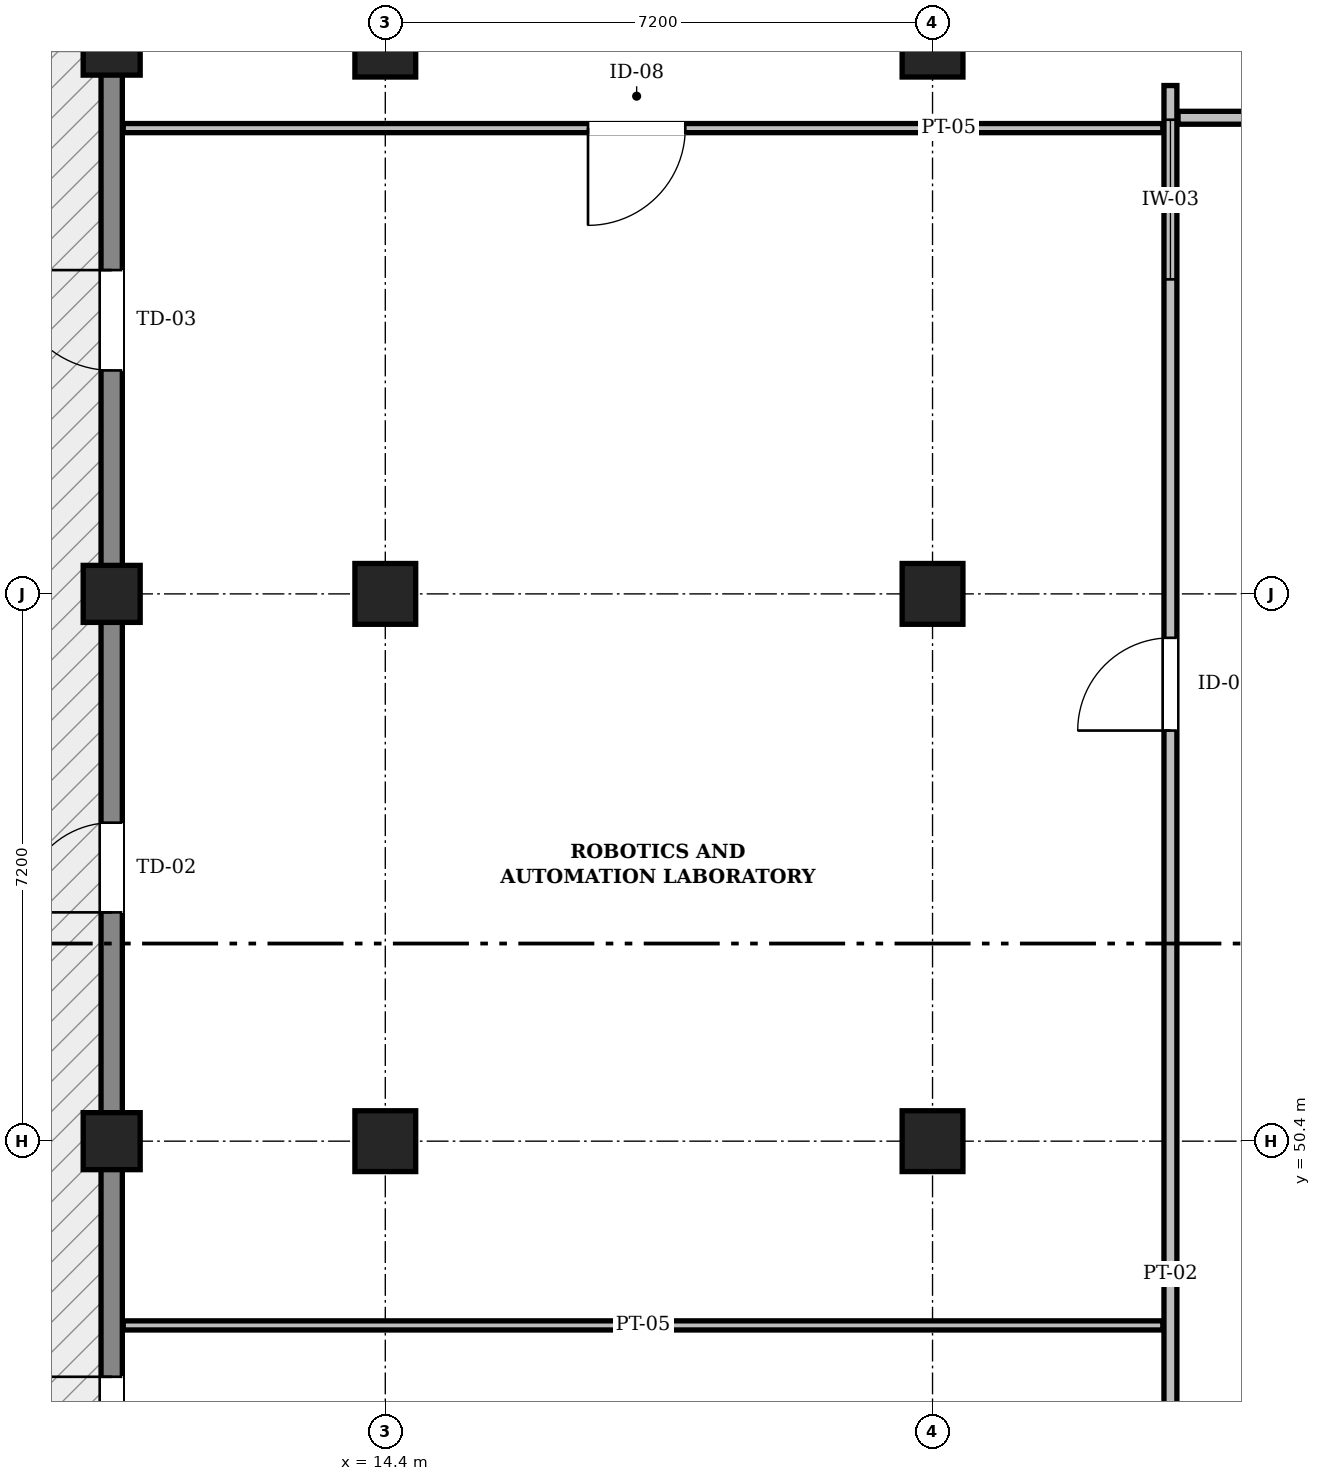
"""IFC4 building model, lengths in metres.
Left out: names, types, materials, properties, quantities, classifications, styles, units other than length and angle.
Written with IfcOpenShell. Run it as: python <this file> out.ifc"""

import sys

from ifc_helpers import new_model, si_unit, direction, frame, frame_2d, origin, origin_2d, place, context, subcontext, project, spatial, rectangle, extrude, element, fill, save


model = new_model("IFC4")
c1 = context("Model", 3, precision=1e-05, world=origin(), true_north=direction((0.0, 1.0)))
c2 = subcontext(c1, "Body", "Model", "MODEL_VIEW")
j1 = project(units=[si_unit("LENGTHUNIT", "METRE"), si_unit("PLANEANGLEUNIT", "RADIAN")], contexts=[c1])
p1 = place(None, origin())
s1 = spatial("IfcSite", under=j1, at=p1, CompositionType="ELEMENT")
p2 = place(p1, origin())
s2 = spatial("IfcBuilding", under=s1, at=p2, CompositionType="ELEMENT")
p3 = place(p2, frame((0.0, 0.0, 9.6)))
s3 = spatial("IfcBuildingStorey", under=s2, at=p3, CompositionType="ELEMENT", Elevation=9.6)
for number, where, z_axis, x_axis in (
    (1, (10.8, 50.4, 0.0), (0.0, 0.0, 1.0), (1.0, 0.0, 0.0)),
    (2, (10.8, 57.6, 0.0), (0.0, 0.0, 1.0), (1.0, 0.0, 0.0)),
    (3, (10.8, 64.8, 0.0), (0.0, 0.0, 1.0), (1.0, 0.0, 0.0)),
):
    element("IfcColumn", number, at=place(p3, frame(where, z_axis=z_axis, x_axis=x_axis)), inside=s3, PredefinedType="COLUMN", context=c2, shape_type="SweptSolid", body=[
        extrude(rectangle(XDim=0.75, YDim=0.75, at=origin_2d()), origin(), (0.0, 0.0, 1.0), 4.8),
    ])
for number, where, z_axis, x_axis in (
    (4, (14.4, 50.4, 0.0), (0.0, 0.0, 1.0), (1.0, 0.0, 0.0)),
    (5, (14.4, 57.6, 0.0), (0.0, 0.0, 1.0), (1.0, 0.0, 0.0)),
    (6, (14.4, 64.8, 0.0), (0.0, 0.0, 1.0), (1.0, 0.0, 0.0)),
    (7, (21.6, 50.4, 0.0), (0.0, 0.0, 1.0), (1.0, 0.0, 0.0)),
    (8, (21.6, 57.6, 0.0), (0.0, 0.0, 1.0), (1.0, 0.0, 0.0)),
    (9, (21.6, 64.8, 0.0), (0.0, 0.0, 1.0), (1.0, 0.0, 0.0)),
):
    element("IfcColumn", number, at=place(p3, frame(where, z_axis=z_axis, x_axis=x_axis)), inside=s3, PredefinedType="COLUMN", context=c2, shape_type="SweptSolid", body=[
        extrude(rectangle(XDim=0.8, YDim=0.8, at=origin_2d()), origin(), (0.0, 0.0, 1.0), 4.8),
    ])
p4 = place(p3, frame((10.8, 43.2, 0.0), z_axis=(0.0, 0.0, 1.0), x_axis=(0.0, 1.0, 0.0)))
e10 = element("IfcWall", 10, at=p4, inside=s3, PredefinedType="SOLIDWALL", context=c2, shape_type="SweptSolid", body=[
    extrude(rectangle(XDim=7.2, YDim=0.28, at=frame_2d((3.6, 0.0))), origin(), (0.0, 0.0, 1.0), 4.52),
])
p5 = place(p4, frame((3.1, 0.0, 0.0)))
e11 = element("IfcOpeningElement", 11, at=p5, cuts=e10, PredefinedType="OPENING", context=c2, shape_type="SweptSolid", body=[
    extrude(rectangle(XDim=1.0, YDim=2.15, at=frame_2d((0.5, 1.075))), frame((0.0, 0.152, 0.0), z_axis=(0.0, -1.0, 0.0), x_axis=(1.0, 0.0, 0.0)), (0.0, 0.0, 1.0), 0.304),
])
p6 = place(p3, frame((10.8, 50.4, 0.0), z_axis=(0.0, 0.0, 1.0), x_axis=(0.0, 1.0, 0.0)))
e12 = element("IfcWall", 12, at=p6, inside=s3, PredefinedType="SOLIDWALL", context=c2, shape_type="SweptSolid", body=[
    extrude(rectangle(XDim=7.2, YDim=0.28, at=frame_2d((3.6, 0.0))), origin(), (0.0, 0.0, 1.0), 4.52),
])
p7 = place(p6, frame((3.01, 0.0, 0.0)))
e13 = element("IfcOpeningElement", 13, at=p7, cuts=e12, PredefinedType="OPENING", context=c2, shape_type="SweptSolid", body=[
    extrude(rectangle(XDim=1.18, YDim=2.18, at=frame_2d((0.59, 1.09))), frame((0.0, 0.152, 0.0), z_axis=(0.0, -1.0, 0.0), x_axis=(1.0, 0.0, 0.0)), (0.0, 0.0, 1.0), 0.304),
])
p8 = place(p3, frame((10.8, 57.6, 0.0), z_axis=(0.0, 0.0, 1.0), x_axis=(0.0, 1.0, 0.0)))
e14 = element("IfcWall", 14, at=p8, inside=s3, PredefinedType="SOLIDWALL", context=c2, shape_type="SweptSolid", body=[
    extrude(rectangle(XDim=7.2, YDim=0.28, at=frame_2d((3.6, 0.0))), origin(), (0.0, 0.0, 1.0), 4.52),
])
p9 = place(p8, frame((2.94, 0.0, 0.0)))
e15 = element("IfcOpeningElement", 15, at=p9, cuts=e14, PredefinedType="OPENING", context=c2, shape_type="SweptSolid", body=[
    extrude(rectangle(XDim=1.32, YDim=2.2, at=frame_2d((0.66, 1.1))), frame((0.0, 0.152, 0.0), z_axis=(0.0, -1.0, 0.0), x_axis=(1.0, 0.0, 0.0)), (0.0, 0.0, 1.0), 0.304),
])
p10 = place(p3, frame((24.73, 32.795, 0.0), z_axis=(0.0, 0.0, 1.0), x_axis=(0.0, 1.0, 0.0)))
e16 = element("IfcWall", 16, at=p10, inside=s3, PredefinedType="PARTITIONING", context=c2, shape_type="SweptSolid", body=[
    extrude(rectangle(XDim=15.74, YDim=0.17, at=frame_2d((7.87, 0.0))), origin(), (0.0, 0.0, 1.0), 4.46),
])
p11 = place(p10, frame((7.03, 0.0, 0.0)))
e17 = element("IfcOpeningElement", 17, at=p11, cuts=e16, PredefinedType="OPENING", context=c2, shape_type="SweptSolid", body=[
    extrude(rectangle(XDim=1.68, YDim=2.28, at=frame_2d((0.84, 1.14))), frame((0.0, 0.097, 0.0), z_axis=(0.0, -1.0, 0.0), x_axis=(1.0, 0.0, 0.0)), (0.0, 0.0, 1.0), 0.194),
])
p12 = place(p3, frame((24.73, 48.536, 0.0), z_axis=(0.0, 0.0, 1.0), x_axis=(0.0, 1.0, 0.0)))
e18 = element("IfcWall", 18, at=p12, inside=s3, PredefinedType="PARTITIONING", context=c2, shape_type="SweptSolid", body=[
    extrude(rectangle(XDim=15.752, YDim=0.17, at=frame_2d((7.876, 0.0))), origin(), (0.0, 0.0, 1.0), 4.46),
])
p13 = place(p12, frame((7.266, 0.0, 0.0)))
e19 = element("IfcOpeningElement", 19, at=p13, cuts=e18, PredefinedType="OPENING", context=c2, shape_type="SweptSolid", body=[
    extrude(rectangle(XDim=1.22, YDim=2.22, at=frame_2d((0.61, 1.11))), frame((0.0, 0.097, 0.0), z_axis=(0.0, -1.0, 0.0), x_axis=(1.0, 0.0, 0.0)), (0.0, 0.0, 1.0), 0.194),
])
p14 = place(p12, frame((13.202, 0.0, 1.05)))
e20 = element("IfcOpeningElement", 20, at=p14, cuts=e18, PredefinedType="OPENING", context=c2, shape_type="SweptSolid", body=[
    extrude(rectangle(XDim=2.1, YDim=1.05, at=frame_2d((1.05, 0.525))), frame((0.0, 0.097, 0.0), z_axis=(0.0, -1.0, 0.0), x_axis=(1.0, 0.0, 0.0)), (0.0, 0.0, 1.0), 0.194),
])
p15 = place(p3, frame((24.83, 63.864, 0.0), z_axis=(0.0, 0.0, 1.0), x_axis=(1.0, 0.0, 0.0)))
e21 = element("IfcWall", 21, at=p15, inside=s3, PredefinedType="PARTITIONING", context=c2, shape_type="SweptSolid", body=[
    extrude(rectangle(XDim=3.74, YDim=0.17, at=frame_2d((1.87, 0.0))), origin(), (0.0, 0.0, 1.0), 4.46),
])
p16 = place(p3, frame((10.952, 47.976, 0.0), z_axis=(0.0, 0.0, 1.0), x_axis=(1.0, 0.0, 0.0)))
e22 = element("IfcWall", 22, at=p16, inside=s3, PredefinedType="PARTITIONING", context=c2, shape_type="SweptSolid", body=[
    extrude(rectangle(XDim=13.678, YDim=0.12, at=frame_2d((6.839, 0.0))), origin(), (0.0, 0.0, 1.0), 4.46),
])
p17 = place(p3, frame((10.952, 63.728, 0.0), z_axis=(0.0, 0.0, 1.0), x_axis=(1.0, 0.0, 0.0)))
e23 = element("IfcWall", 23, at=p17, inside=s3, PredefinedType="PARTITIONING", context=c2, shape_type="SweptSolid", body=[
    extrude(rectangle(XDim=13.678, YDim=0.12, at=frame_2d((6.839, 0.0))), origin(), (0.0, 0.0, 1.0), 4.46),
])
p18 = place(p17, frame((6.115, 0.0, 0.0)))
e24 = element("IfcOpeningElement", 24, at=p18, cuts=e23, PredefinedType="OPENING", context=c2, shape_type="SweptSolid", body=[
    extrude(rectangle(XDim=1.28, YDim=2.22, at=frame_2d((0.64, 1.11))), frame((0.0, 0.072, 0.0), z_axis=(0.0, -1.0, 0.0), x_axis=(1.0, 0.0, 0.0)), (0.0, 0.0, 1.0), 0.144),
])
p19 = place(p5, origin())
e25 = element("IfcDoor", 25, at=p19, inside=s3, OperationType="SINGLE_SWING_RIGHT", PredefinedType="DOOR", context=c2, shape_type="SweptSolid", body=[
    extrude(rectangle(XDim=1.0, YDim=2.15, at=frame_2d((0.5, 1.075))), frame((0.0, 0.025, 0.0), z_axis=(0.0, -1.0, 0.0), x_axis=(1.0, 0.0, 0.0)), (0.0, 0.0, 1.0), 0.05),
])
fill(e11, e25)
p20 = place(p7, origin())
e26 = element("IfcDoor", 26, at=p20, inside=s3, OperationType="SINGLE_SWING_LEFT", PredefinedType="DOOR", context=c2, shape_type="SweptSolid", body=[
    extrude(rectangle(XDim=1.18, YDim=2.18, at=frame_2d((0.59, 1.09))), frame((0.0, 0.025, 0.0), z_axis=(0.0, -1.0, 0.0), x_axis=(1.0, 0.0, 0.0)), (0.0, 0.0, 1.0), 0.05),
])
fill(e13, e26)
p21 = place(p9, origin())
e27 = element("IfcDoor", 27, at=p21, inside=s3, OperationType="SINGLE_SWING_RIGHT", PredefinedType="DOOR", context=c2, shape_type="SweptSolid", body=[
    extrude(rectangle(XDim=1.32, YDim=2.2, at=frame_2d((0.66, 1.1))), frame((0.0, 0.025, 0.0), z_axis=(0.0, -1.0, 0.0), x_axis=(1.0, 0.0, 0.0)), (0.0, 0.0, 1.0), 0.05),
])
fill(e15, e27)
p22 = place(p13, origin())
e28 = element("IfcDoor", 28, at=p22, inside=s3, OperationType="SINGLE_SWING_LEFT", PredefinedType="DOOR", context=c2, shape_type="SweptSolid", body=[
    extrude(rectangle(XDim=1.22, YDim=2.22, at=frame_2d((0.61, 1.11))), frame((0.0, 0.025, 0.0), z_axis=(0.0, -1.0, 0.0), x_axis=(1.0, 0.0, 0.0)), (0.0, 0.0, 1.0), 0.05),
])
fill(e19, e28)
p23 = place(p14, origin())
e29 = element("IfcWindow", 29, at=p23, inside=s3, PartitioningType="SINGLE_PANEL", PredefinedType="WINDOW", context=c2, shape_type="SweptSolid", body=[
    extrude(rectangle(XDim=2.1, YDim=1.05, at=frame_2d((1.05, 0.525))), frame((0.0, 0.03, 0.0), z_axis=(0.0, -1.0, 0.0), x_axis=(1.0, 0.0, 0.0)), (0.0, 0.0, 1.0), 0.06),
])
fill(e20, e29)
p24 = place(p18, frame((1.28, 0.0, 0.0), z_axis=(0.0, 0.0, 1.0), x_axis=(-1.0, 0.0, 0.0)))
e30 = element("IfcDoor", 30, at=p24, inside=s3, OperationType="SINGLE_SWING_RIGHT", PredefinedType="DOOR", context=c2, shape_type="SweptSolid", body=[
    extrude(rectangle(XDim=1.28, YDim=2.22, at=frame_2d((0.64, 1.11))), frame((0.0, 0.025, 0.0), z_axis=(0.0, -1.0, 0.0), x_axis=(1.0, 0.0, 0.0)), (0.0, 0.0, 1.0), 0.05),
])
fill(e24, e30)
save(model, sys.argv[1])
